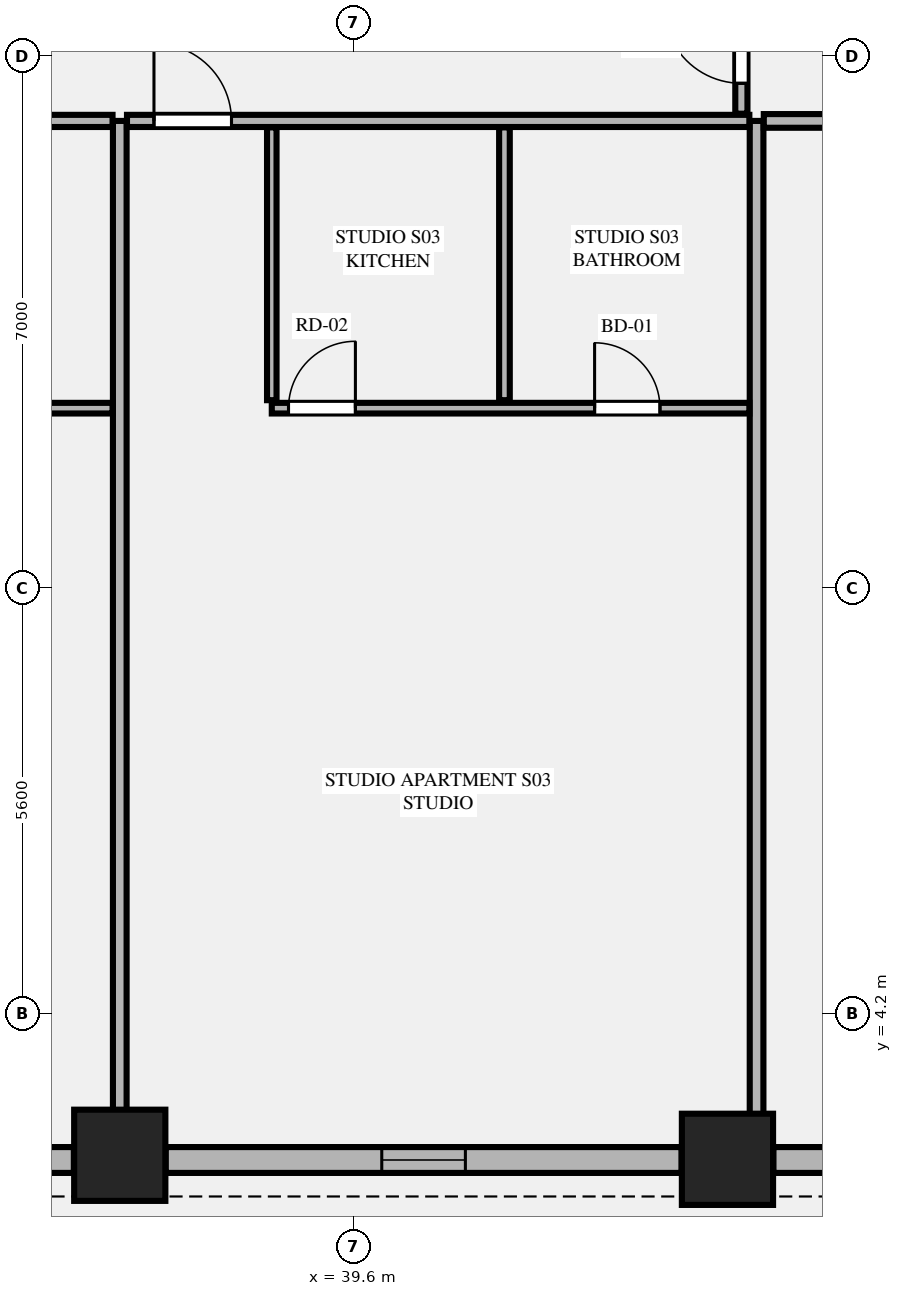
"""IFC4 building model, lengths in metres.
Left out: names, types, materials, properties, quantities, classifications, styles, units other than length and angle.
Written with IfcOpenShell. Run it as: python <this file> out.ifc"""

import sys

from ifc_helpers import new_model, si_unit, direction, frame, frame_2d, origin, origin_2d, place, context, subcontext, project, spatial, rectangle, extrude, element, fill, save


model = new_model("IFC4")
c1 = context("Model", 3, precision=1e-05, world=origin(), true_north=direction((0.0, 1.0)))
c2 = subcontext(c1, "Body", "Model", "MODEL_VIEW")
j1 = project(units=[si_unit("LENGTHUNIT", "METRE"), si_unit("PLANEANGLEUNIT", "RADIAN")], contexts=[c1])
p1 = place(None, origin())
s1 = spatial("IfcSite", under=j1, at=p1, CompositionType="ELEMENT")
p2 = place(p1, origin())
s2 = spatial("IfcBuilding", under=s1, at=p2, CompositionType="ELEMENT")
p3 = place(p2, frame((0.0, 0.0, 24.9)))
s3 = spatial("IfcBuildingStorey", under=s2, at=p3, CompositionType="ELEMENT", Elevation=24.9)
for number, where, z_axis, x_axis in (
    (1, (36.522, 2.342, 0.0), (0.0, 0.0, 1.0), (1.0, 0.0, 0.0)),
    (2, (44.517, 2.289, 0.0), (0.0, 0.0, 1.0), (1.0, 0.0, 0.0)),
):
    element("IfcColumn", number, at=place(p3, frame(where, z_axis=z_axis, x_axis=x_axis)), inside=s3, PredefinedType="COLUMN", context=c2, shape_type="SweptSolid", body=[
        extrude(rectangle(XDim=1.2, YDim=1.2, at=origin_2d()), origin(), (0.0, 0.0, 1.0), 3.55),
    ])
p4 = place(p3, frame((28.882, 2.28, 0.0), z_axis=(0.0, 0.0, 1.0), x_axis=(1.0, 0.0, 0.0)))
e3 = element("IfcWall", 3, at=p4, inside=s3, PredefinedType="STANDARD", context=c2, shape_type="SweptSolid", body=[
    extrude(rectangle(XDim=7.036, YDim=0.34, at=frame_2d((3.518, 0.0))), origin(), (0.0, 0.0, 1.0), 2.787),
])
p5 = place(p4, frame((2.768, 0.0, 0.0)))
e4 = element("IfcOpeningElement", 4, at=p5, cuts=e3, PredefinedType="OPENING", context=c2, shape_type="SweptSolid", body=[
    extrude(rectangle(XDim=1.5, YDim=2.3, at=frame_2d((0.75, 1.15))), frame((0.0, 0.18, 0.0), z_axis=(0.0, -1.0, 0.0), x_axis=(1.0, 0.0, 0.0)), (0.0, 0.0, 1.0), 0.36),
])
p6 = place(p3, frame((37.126, 2.28, 0.0), z_axis=(0.0, 0.0, 1.0), x_axis=(1.0, 0.0, 0.0)))
e5 = element("IfcWall", 5, at=p6, inside=s3, PredefinedType="STANDARD", context=c2, shape_type="SweptSolid", body=[
    extrude(rectangle(XDim=6.787, YDim=0.34, at=frame_2d((3.394, 0.0))), origin(), (0.0, 0.0, 1.0), 2.787),
])
p7 = place(p6, frame((2.843, 0.0, 0.75)))
e6 = element("IfcOpeningElement", 6, at=p7, cuts=e5, PredefinedType="OPENING", context=c2, shape_type="SweptSolid", body=[
    extrude(rectangle(XDim=1.1, YDim=1.887, at=frame_2d((0.55, 0.943))), frame((0.0, 0.18, 0.0), z_axis=(0.0, -1.0, 0.0), x_axis=(1.0, 0.0, 0.0)), (0.0, 0.0, 1.0), 0.36),
])
p8 = place(p3, frame((45.121, 2.28, 0.0), z_axis=(0.0, 0.0, 1.0), x_axis=(1.0, 0.0, 0.0)))
e7 = element("IfcWall", 7, at=p8, inside=s3, PredefinedType="STANDARD", context=c2, shape_type="SweptSolid", body=[
    extrude(rectangle(XDim=1.245, YDim=0.34, at=frame_2d((0.623, 0.0))), origin(), (0.0, 0.0, 1.0), 3.33),
])
p9 = place(p3, frame((36.522, 2.455, 0.0), z_axis=(0.0, 0.0, 1.0), x_axis=(0.0, 1.0, 0.0)))
e8 = element("IfcWall", 8, at=p9, inside=s3, PredefinedType="PARTITIONING", context=c2, shape_type="SweptSolid", body=[
    extrude(rectangle(XDim=13.495, YDim=0.18, at=frame_2d((6.748, 0.0))), origin(), (0.0, 0.0, 1.0), 2.637),
])
p10 = place(p3, frame((44.9, 2.455, 0.0), z_axis=(0.0, 0.0, 1.0), x_axis=(0.0, 1.0, 0.0)))
e9 = element("IfcWall", 9, at=p10, inside=s3, PredefinedType="PARTITIONING", context=c2, shape_type="SweptSolid", body=[
    extrude(rectangle(XDim=13.495, YDim=0.18, at=frame_2d((6.748, 0.0))), origin(), (0.0, 0.0, 1.0), 3.33),
])
p11 = place(p3, frame((28.373, 15.95, 0.0), z_axis=(0.0, 0.0, 1.0), x_axis=(1.0, 0.0, 0.0)))
e10 = element("IfcWall", 10, at=p11, inside=s3, PredefinedType="PARTITIONING", context=c2, shape_type="SweptSolid", body=[
    extrude(rectangle(XDim=8.054, YDim=0.16, at=frame_2d((4.027, 0.0))), origin(), (0.0, 0.0, 1.0), 3.33),
])
p12 = place(p11, frame((0.355, 0.0, 0.0)))
e11 = element("IfcOpeningElement", 11, at=p12, cuts=e10, PredefinedType="OPENING", context=c2, shape_type="SweptSolid", body=[
    extrude(rectangle(XDim=1.02, YDim=2.25, at=frame_2d((0.51, 1.125))), frame((0.0, 0.09, 0.0), z_axis=(0.0, -1.0, 0.0), x_axis=(1.0, 0.0, 0.0)), (0.0, 0.0, 1.0), 0.18),
])
p13 = place(p3, frame((30.278, 12.171, 0.0), z_axis=(0.0, 0.0, 1.0), x_axis=(1.0, 0.0, 0.0)))
e12 = element("IfcWall", 12, at=p13, inside=s3, PredefinedType="PLUMBINGWALL", context=c2, shape_type="SweptSolid", body=[
    extrude(rectangle(XDim=6.149, YDim=0.14, at=frame_2d((3.074, 0.0))), origin(), (0.0, 0.0, 1.0), 3.33),
])
p14 = place(p13, frame((4.148, 0.0, 0.0)))
e13 = element("IfcOpeningElement", 13, at=p14, cuts=e12, PredefinedType="OPENING", context=c2, shape_type="SweptSolid", body=[
    extrude(rectangle(XDim=0.86, YDim=2.1, at=frame_2d((0.43, 1.05))), frame((0.0, 0.08, 0.0), z_axis=(0.0, -1.0, 0.0), x_axis=(1.0, 0.0, 0.0)), (0.0, 0.0, 1.0), 0.16),
])
p15 = place(p13, frame((0.22, 0.0, 0.0)))
e14 = element("IfcOpeningElement", 14, at=p15, cuts=e12, PredefinedType="OPENING", context=c2, shape_type="SweptSolid", body=[
    extrude(rectangle(XDim=0.88, YDim=2.15, at=frame_2d((0.44, 1.075))), frame((0.0, 0.08, 0.0), z_axis=(0.0, -1.0, 0.0), x_axis=(1.0, 0.0, 0.0)), (0.0, 0.0, 1.0), 0.16),
])
p16 = place(p3, frame((36.617, 15.95, 0.0), z_axis=(0.0, 0.0, 1.0), x_axis=(1.0, 0.0, 0.0)))
e15 = element("IfcWall", 15, at=p16, inside=s3, PredefinedType="PARTITIONING", context=c2, shape_type="SweptSolid", body=[
    extrude(rectangle(XDim=8.188, YDim=0.16, at=frame_2d((4.094, 0.0))), origin(), (0.0, 0.0, 1.0), 3.33),
])
p17 = place(p16, frame((0.355, 0.0, 0.0)))
e16 = element("IfcOpeningElement", 16, at=p17, cuts=e15, PredefinedType="OPENING", context=c2, shape_type="SweptSolid", body=[
    extrude(rectangle(XDim=1.02, YDim=2.25, at=frame_2d((0.51, 1.125))), frame((0.0, 0.09, 0.0), z_axis=(0.0, -1.0, 0.0), x_axis=(1.0, 0.0, 0.0)), (0.0, 0.0, 1.0), 0.18),
])
p18 = place(p3, frame((38.522, 12.276, 0.0), z_axis=(0.0, 0.0, 1.0), x_axis=(0.0, 1.0, 0.0)))
e17 = element("IfcWall", 17, at=p18, inside=s3, PredefinedType="PARTITIONING", context=c2, shape_type="SweptSolid", body=[
    extrude(rectangle(XDim=3.589, YDim=0.125, at=frame_2d((1.794, 0.0))), origin(), (0.0, 0.0, 1.0), 3.33),
])
p19 = place(p3, frame((38.522, 12.171, 0.0), z_axis=(0.0, 0.0, 1.0), x_axis=(1.0, 0.0, 0.0)))
e18 = element("IfcWall", 18, at=p19, inside=s3, PredefinedType="PLUMBINGWALL", context=c2, shape_type="SweptSolid", body=[
    extrude(rectangle(XDim=6.283, YDim=0.14, at=frame_2d((3.142, 0.0))), origin(), (0.0, 0.0, 1.0), 3.33),
])
p20 = place(p19, frame((4.247, 0.0, 0.0)))
e19 = element("IfcOpeningElement", 19, at=p20, cuts=e18, PredefinedType="OPENING", context=c2, shape_type="SweptSolid", body=[
    extrude(rectangle(XDim=0.86, YDim=2.1, at=frame_2d((0.43, 1.05))), frame((0.0, 0.08, 0.0), z_axis=(0.0, -1.0, 0.0), x_axis=(1.0, 0.0, 0.0)), (0.0, 0.0, 1.0), 0.16),
])
p21 = place(p19, frame((0.22, 0.0, 0.0)))
e20 = element("IfcOpeningElement", 20, at=p21, cuts=e18, PredefinedType="OPENING", context=c2, shape_type="SweptSolid", body=[
    extrude(rectangle(XDim=0.88, YDim=2.15, at=frame_2d((0.44, 1.075))), frame((0.0, 0.08, 0.0), z_axis=(0.0, -1.0, 0.0), x_axis=(1.0, 0.0, 0.0)), (0.0, 0.0, 1.0), 0.16),
])
p22 = place(p3, frame((41.583, 12.276, 0.0), z_axis=(0.0, 0.0, 1.0), x_axis=(0.0, 1.0, 0.0)))
e21 = element("IfcWall", 21, at=p22, inside=s3, PredefinedType="PLUMBINGWALL", context=c2, shape_type="SweptSolid", body=[
    extrude(rectangle(XDim=3.589, YDim=0.14, at=frame_2d((1.794, 0.0))), origin(), (0.0, 0.0, 1.0), 3.33),
])
p23 = place(p3, frame((44.995, 15.95, 0.0), z_axis=(0.0, 0.0, 1.0), x_axis=(1.0, 0.0, 0.0)))
e22 = element("IfcWall", 22, at=p23, inside=s3, PredefinedType="PARTITIONING", context=c2, shape_type="SweptSolid", body=[
    extrude(rectangle(XDim=9.241, YDim=0.18, at=frame_2d((4.621, 0.0))), origin(), (0.0, 0.0, 1.0), 3.33),
])
p24 = place(p3, frame((44.7, 16.045, 0.0), z_axis=(0.0, 0.0, 1.0), x_axis=(0.0, 1.0, 0.0)))
e23 = element("IfcWall", 23, at=p24, inside=s3, PredefinedType="PARTITIONING", context=c2, shape_type="SweptSolid", body=[
    extrude(rectangle(XDim=6.576, YDim=0.16, at=frame_2d((3.288, 0.0))), origin(), (0.0, 0.0, 1.0), 3.33),
])
p25 = place(p24, frame((0.4, 0.0, 0.0)))
e24 = element("IfcOpeningElement", 24, at=p25, cuts=e23, PredefinedType="OPENING", context=c2, shape_type="SweptSolid", body=[
    extrude(rectangle(XDim=1.02, YDim=2.25, at=frame_2d((0.51, 1.125))), frame((0.0, 0.09, 0.0), z_axis=(0.0, -1.0, 0.0), x_axis=(1.0, 0.0, 0.0)), (0.0, 0.0, 1.0), 0.18),
])
p26 = place(p7, origin())
e25 = element("IfcWindow", 25, at=p26, inside=s3, PartitioningType="SINGLE_PANEL", PredefinedType="WINDOW", context=c2, shape_type="SweptSolid", body=[
    extrude(rectangle(XDim=1.1, YDim=1.887, at=frame_2d((0.55, 0.943))), frame((0.0, 0.03, 0.0), z_axis=(0.0, -1.0, 0.0), x_axis=(1.0, 0.0, 0.0)), (0.0, 0.0, 1.0), 0.06),
])
fill(e6, e25)
p27 = place(p20, origin())
e26 = element("IfcDoor", 26, at=p27, inside=s3, OperationType="SINGLE_SWING_LEFT", PredefinedType="DOOR", context=c2, shape_type="SweptSolid", body=[
    extrude(rectangle(XDim=0.86, YDim=2.1, at=frame_2d((0.43, 1.05))), frame((0.0, 0.025, 0.0), z_axis=(0.0, -1.0, 0.0), x_axis=(1.0, 0.0, 0.0)), (0.0, 0.0, 1.0), 0.05),
])
fill(e19, e26)
p28 = place(p17, origin())
e27 = element("IfcDoor", 27, at=p28, inside=s3, OperationType="SINGLE_SWING_LEFT", PredefinedType="DOOR", context=c2, shape_type="SweptSolid", body=[
    extrude(rectangle(XDim=1.02, YDim=2.25, at=frame_2d((0.51, 1.125))), frame((0.0, 0.025, 0.0), z_axis=(0.0, -1.0, 0.0), x_axis=(1.0, 0.0, 0.0)), (0.0, 0.0, 1.0), 0.05),
])
fill(e16, e27)
p29 = place(p21, origin())
e28 = element("IfcDoor", 28, at=p29, inside=s3, OperationType="SINGLE_SWING_RIGHT", PredefinedType="DOOR", context=c2, shape_type="SweptSolid", body=[
    extrude(rectangle(XDim=0.88, YDim=2.15, at=frame_2d((0.44, 1.075))), frame((0.0, 0.025, 0.0), z_axis=(0.0, -1.0, 0.0), x_axis=(1.0, 0.0, 0.0)), (0.0, 0.0, 1.0), 0.05),
])
fill(e20, e28)
p30 = place(p25, origin())
e29 = element("IfcDoor", 29, at=p30, inside=s3, OperationType="SINGLE_SWING_RIGHT", PredefinedType="DOOR", context=c2, shape_type="SweptSolid", body=[
    extrude(rectangle(XDim=1.02, YDim=2.25, at=frame_2d((0.51, 1.125))), frame((0.0, 0.025, 0.0), z_axis=(0.0, -1.0, 0.0), x_axis=(1.0, 0.0, 0.0)), (0.0, 0.0, 1.0), 0.05),
])
fill(e24, e29)
save(model, sys.argv[1])
